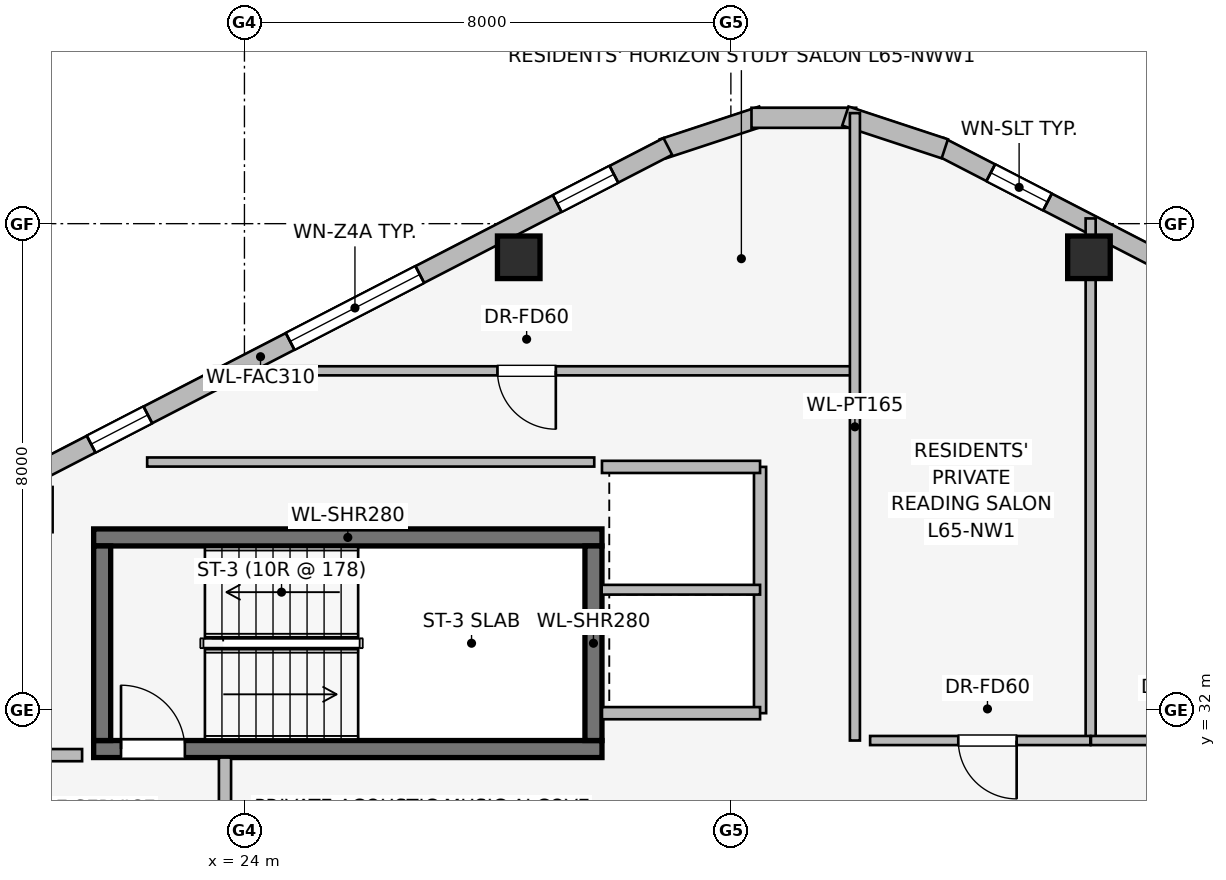
"""IFC4 building model, lengths in metres.
Left out: names, types, materials, properties, quantities, classifications, styles, units other than length and angle.
Written with IfcOpenShell. Run it as: python <this file> out.ifc"""

import sys

from ifc_helpers import new_model, si_unit, direction, frame, frame_2d, origin, origin_2d, place, context, subcontext, project, spatial, rectangle, extrude, element, fill, save


model = new_model("IFC4")
c1 = context("Model", 3, precision=1e-05, world=origin(), true_north=direction((0.0, 1.0)))
c2 = subcontext(c1, "Body", "Model", "MODEL_VIEW")
j1 = project(units=[si_unit("LENGTHUNIT", "METRE"), si_unit("PLANEANGLEUNIT", "RADIAN")], contexts=[c1])
p1 = place(None, origin())
s1 = spatial("IfcSite", under=j1, at=p1, CompositionType="ELEMENT")
p2 = place(p1, origin())
s2 = spatial("IfcBuilding", under=s1, at=p2, CompositionType="ELEMENT")
p3 = place(p2, frame((0.0, 0.0, 238.35)))
s3 = spatial("IfcBuildingStorey", under=s2, at=p3, CompositionType="ELEMENT", Elevation=238.35)
p4 = place(p3, frame((21.52, 31.36, 0.0), z_axis=(0.0, 0.0, 1.0), x_axis=(1.0, 0.0, 0.0)))
e1 = element("IfcWall", 1, at=p4, inside=s3, PredefinedType="SHEAR", context=c2, shape_type="SweptSolid", body=[
    extrude(rectangle(XDim=8.36, YDim=0.28, at=frame_2d((4.18, 0.0))), origin(), (0.0, 0.0, 1.0), 3.55),
])
p5 = place(p4, frame((0.45, 0.0, 0.0)))
e2 = element("IfcOpeningElement", 2, at=p5, cuts=e1, PredefinedType="OPENING", context=c2, shape_type="SweptSolid", body=[
    extrude(rectangle(XDim=1.05, YDim=2.0, at=frame_2d((0.525, 1.0))), frame((0.0, 0.15, 0.0), z_axis=(0.0, -1.0, 0.0), x_axis=(1.0, 0.0, 0.0)), (0.0, 0.0, 1.0), 0.3),
])
p6 = place(p3, frame((29.88, 34.84, 0.0), z_axis=(0.0, 0.0, 1.0), x_axis=(-1.0, 0.0, 0.0)))
e3 = element("IfcWall", 3, at=p6, inside=s3, PredefinedType="SHEAR", context=c2, shape_type="SweptSolid", body=[
    extrude(rectangle(XDim=8.36, YDim=0.28, at=frame_2d((4.18, 0.0))), origin(), (0.0, 0.0, 1.0), 3.55),
])
for number, where, z_axis, x_axis in (
    (4, (21.66, 34.7, 0.0), (0.0, 0.0, 1.0), (0.0, -1.0, 0.0)),
    (5, (29.74, 31.5, 0.0), (0.0, 0.0, 1.0), (0.0, 1.0, 0.0)),
):
    element("IfcWall", number, at=place(p3, frame(where, z_axis=z_axis, x_axis=x_axis)), inside=s3, PredefinedType="SHEAR", context=c2, shape_type="SweptSolid", body=[
        extrude(rectangle(XDim=3.2, YDim=0.28, at=frame_2d((1.6, 0.0))), origin(), (0.0, 0.0, 1.0), 3.55),
    ])
for number, where, z_axis, x_axis in (
    (6, (37.889, 39.447, 0.0), (0.0, 0.0, 1.0), (1.0, 0.0, 0.0)),
    (7, (28.511, 39.447, 0.0), (0.0, 0.0, 1.0), (1.0, 0.0, 0.0)),
):
    element("IfcColumn", number, at=place(p3, frame(where, z_axis=z_axis, x_axis=x_axis)), inside=s3, PredefinedType="COLUMN", context=c2, shape_type="SweptSolid", body=[
        extrude(rectangle(XDim=0.7, YDim=0.7, at=origin_2d()), origin(), (0.0, 0.0, 1.0), 3.55),
    ])
p7 = place(p3, frame((35.437, 41.27, 0.0), z_axis=(0.0, 0.0, 1.0), x_axis=(0.888581481622, -0.458718814218, 0.0)))
e8 = element("IfcWall", 8, at=p7, inside=s3, PredefinedType="STANDARD", context=c2, shape_type="SweptSolid", body=[
    extrude(rectangle(XDim=15.077, YDim=0.31, at=frame_2d((7.539, 0.0))), origin(), (0.0, 0.0, 1.0), 3.26),
])
p8 = place(p7, frame((0.942, 0.0, 0.75)))
e9 = element("IfcOpeningElement", 9, at=p8, cuts=e8, PredefinedType="OPENING", context=c2, shape_type="SweptSolid", body=[
    extrude(rectangle(XDim=1.05, YDim=1.4, at=frame_2d((0.525, 0.7))), frame((0.0, 0.165, 0.0), z_axis=(0.0, -1.0, 0.0), x_axis=(1.0, 0.0, 0.0)), (0.0, 0.0, 1.0), 0.33),
])
p9 = place(p7, frame((4.344, 0.0, 0.75)))
e10 = element("IfcOpeningElement", 10, at=p9, cuts=e8, PredefinedType="OPENING", context=c2, shape_type="SweptSolid", body=[
    extrude(rectangle(XDim=1.05, YDim=1.4, at=frame_2d((0.525, 0.7))), frame((0.0, 0.165, 0.0), z_axis=(0.0, -1.0, 0.0), x_axis=(1.0, 0.0, 0.0)), (0.0, 0.0, 1.0), 0.33),
])
p10 = place(p7, frame((7.013, 0.0, 0.75)))
e11 = element("IfcOpeningElement", 11, at=p10, cuts=e8, PredefinedType="OPENING", context=c2, shape_type="SweptSolid", body=[
    extrude(rectangle(XDim=1.05, YDim=1.4, at=frame_2d((0.525, 0.7))), frame((0.0, 0.165, 0.0), z_axis=(0.0, -1.0, 0.0), x_axis=(1.0, 0.0, 0.0)), (0.0, 0.0, 1.0), 0.33),
])
p11 = place(p7, frame((9.681, 0.0, 0.75)))
e12 = element("IfcOpeningElement", 12, at=p11, cuts=e8, PredefinedType="OPENING", context=c2, shape_type="SweptSolid", body=[
    extrude(rectangle(XDim=1.05, YDim=1.4, at=frame_2d((0.525, 0.7))), frame((0.0, 0.165, 0.0), z_axis=(0.0, -1.0, 0.0), x_axis=(1.0, 0.0, 0.0)), (0.0, 0.0, 1.0), 0.33),
])
p12 = place(p7, frame((13.029, 0.0, 0.75)))
e13 = element("IfcOpeningElement", 13, at=p12, cuts=e8, PredefinedType="OPENING", context=c2, shape_type="SweptSolid", body=[
    extrude(rectangle(XDim=1.05, YDim=1.4, at=frame_2d((0.525, 0.7))), frame((0.0, 0.165, 0.0), z_axis=(0.0, -1.0, 0.0), x_axis=(1.0, 0.0, 0.0)), (0.0, 0.0, 1.0), 0.33),
])
p13 = place(p3, frame((30.882, 41.231, 0.0), z_axis=(0.0, 0.0, 1.0), x_axis=(0.949713440491, 0.313120393699, 0.0)))
e14 = element("IfcWall", 14, at=p13, inside=s3, PredefinedType="STANDARD", context=c2, shape_type="SweptSolid", body=[
    extrude(rectangle(XDim=1.722, YDim=0.33, at=frame_2d((0.861, 0.0))), origin(), (0.0, 0.0, 1.0), 3.26),
])
p14 = place(p3, frame((32.339, 41.741, 0.0), z_axis=(0.0, 0.0, 1.0), x_axis=(1.0, 0.0, 0.0)))
e15 = element("IfcWall", 15, at=p14, inside=s3, PredefinedType="STANDARD", context=c2, shape_type="SweptSolid", body=[
    extrude(rectangle(XDim=1.722, YDim=0.33, at=frame_2d((0.861, 0.0))), origin(), (0.0, 0.0, 1.0), 3.26),
])
p15 = place(p3, frame((33.883, 41.77, 0.0), z_axis=(0.0, 0.0, 1.0), x_axis=(0.949713440491, -0.313120393699, 0.0)))
e16 = element("IfcWall", 16, at=p15, inside=s3, PredefinedType="STANDARD", context=c2, shape_type="SweptSolid", body=[
    extrude(rectangle(XDim=1.722, YDim=0.33, at=frame_2d((0.861, 0.0))), origin(), (0.0, 0.0, 1.0), 3.26),
])
p16 = place(p3, frame((17.566, 34.354, 0.0), z_axis=(0.0, 0.0, 1.0), x_axis=(0.888581481622, 0.458718814218, 0.0)))
e17 = element("IfcWall", 17, at=p16, inside=s3, PredefinedType="STANDARD", context=c2, shape_type="SweptSolid", body=[
    extrude(rectangle(XDim=15.077, YDim=0.31, at=frame_2d((7.539, 0.0))), origin(), (0.0, 0.0, 1.0), 3.26),
])
p17 = place(p16, frame((0.998, 0.0, 0.75)))
e18 = element("IfcOpeningElement", 18, at=p17, cuts=e17, PredefinedType="OPENING", context=c2, shape_type="SweptSolid", body=[
    extrude(rectangle(XDim=1.05, YDim=1.4, at=frame_2d((0.525, 0.7))), frame((0.0, 0.165, 0.0), z_axis=(0.0, -1.0, 0.0), x_axis=(1.0, 0.0, 0.0)), (0.0, 0.0, 1.0), 0.33),
])
p18 = place(p16, frame((4.403, 0.0, 0.75)))
e19 = element("IfcOpeningElement", 19, at=p18, cuts=e17, PredefinedType="OPENING", context=c2, shape_type="SweptSolid", body=[
    extrude(rectangle(XDim=1.05, YDim=1.4, at=frame_2d((0.525, 0.7))), frame((0.0, 0.165, 0.0), z_axis=(0.0, -1.0, 0.0), x_axis=(1.0, 0.0, 0.0)), (0.0, 0.0, 1.0), 0.33),
])
p19 = place(p16, frame((8.086, 0.0, 0.75)))
e20 = element("IfcOpeningElement", 20, at=p19, cuts=e17, PredefinedType="OPENING", context=c2, shape_type="SweptSolid", body=[
    extrude(rectangle(XDim=2.4, YDim=1.6, at=frame_2d((1.2, 0.8))), frame((0.0, 0.165, 0.0), z_axis=(0.0, -1.0, 0.0), x_axis=(1.0, 0.0, 0.0)), (0.0, 0.0, 1.0), 0.33),
])
p20 = place(p16, frame((13.029, 0.0, 0.75)))
e21 = element("IfcOpeningElement", 21, at=p20, cuts=e17, PredefinedType="OPENING", context=c2, shape_type="SweptSolid", body=[
    extrude(rectangle(XDim=1.05, YDim=1.4, at=frame_2d((0.525, 0.7))), frame((0.0, 0.165, 0.0), z_axis=(0.0, -1.0, 0.0), x_axis=(1.0, 0.0, 0.0)), (0.0, 0.0, 1.0), 0.33),
])
p21 = place(p3, frame((23.68, 25.68, 0.0), z_axis=(0.0, 0.0, 1.0), x_axis=(0.0, 1.0, 0.0)))
e22 = element("IfcWall", 22, at=p21, inside=s3, PredefinedType="PARTITIONING", context=c2, shape_type="SweptSolid", body=[
    extrude(rectangle(XDim=5.54, YDim=0.2, at=frame_2d((2.77, 0.0))), origin(), (0.0, 0.0, 1.0), 3.26),
])
p22 = place(p21, frame((1.8, 0.0, 0.0)))
e23 = element("IfcOpeningElement", 23, at=p22, cuts=e22, PredefinedType="OPENING", context=c2, shape_type="SweptSolid", body=[
    extrude(rectangle(XDim=1.05, YDim=2.0, at=frame_2d((0.525, 1.0))), frame((0.0, 0.11, 0.0), z_axis=(0.0, -1.0, 0.0), x_axis=(1.0, 0.0, 0.0)), (0.0, 0.0, 1.0), 0.22),
])
p23 = place(p3, frame((21.33, 31.26, 0.0), z_axis=(0.0, 0.0, 1.0), x_axis=(-1.0, 0.0, 0.0)))
e24 = element("IfcWall", 24, at=p23, inside=s3, PredefinedType="PARTITIONING", context=c2, shape_type="SweptSolid", body=[
    extrude(rectangle(XDim=1.68, YDim=0.2, at=frame_2d((0.84, 0.0))), origin(), (0.0, 0.0, 1.0), 3.26),
])
p24 = place(p3, frame((32.48, 31.95, 0.0), z_axis=(0.0, 0.0, 1.0), x_axis=(0.0, 1.0, 0.0)))
e25 = element("IfcWall", 25, at=p24, inside=s3, PredefinedType="PARTITIONING", context=c2, shape_type="SweptSolid", body=[
    extrude(rectangle(XDim=4.05, YDim=0.2, at=frame_2d((2.025, 0.0))), origin(), (0.0, 0.0, 1.0), 3.26),
])
p25 = place(p3, frame((29.88, 36.0, 0.0), z_axis=(0.0, 0.0, 1.0), x_axis=(1.0, 0.0, 0.0)))
e26 = element("IfcWall", 26, at=p25, inside=s3, PredefinedType="PARTITIONING", context=c2, shape_type="SweptSolid", body=[
    extrude(rectangle(XDim=2.6, YDim=0.2, at=frame_2d((1.3, 0.0))), origin(), (0.0, 0.0, 1.0), 3.26),
])
p26 = place(p3, frame((32.48, 31.95, 0.0), z_axis=(0.0, 0.0, 1.0), x_axis=(-1.0, 0.0, 0.0)))
e27 = element("IfcWall", 27, at=p26, inside=s3, PredefinedType="PARTITIONING", context=c2, shape_type="SweptSolid", body=[
    extrude(rectangle(XDim=2.6, YDim=0.2, at=frame_2d((1.3, 0.0))), origin(), (0.0, 0.0, 1.0), 2.652),
])
p27 = place(p3, frame((29.875, 33.98, 0.0), z_axis=(0.0, 0.0, 1.0), x_axis=(1.0, 0.0, 0.0)))
e28 = element("IfcWall", 28, at=p27, inside=s3, PredefinedType="PARTITIONING", context=c2, shape_type="SweptSolid", body=[
    extrude(rectangle(XDim=2.605, YDim=0.16, at=frame_2d((1.302, 0.0))), origin(), (0.0, 0.0, 1.0), 3.26),
])
p28 = place(p3, frame((34.0, 37.58, 0.0), z_axis=(0.0, 0.0, 1.0), x_axis=(-1.0, 0.0, 0.0)))
e29 = element("IfcWall", 29, at=p28, inside=s3, PredefinedType="PARTITIONING", context=c2, shape_type="SweptSolid", body=[
    extrude(rectangle(XDim=10.501, YDim=0.15, at=frame_2d((5.25, 0.0))), origin(), (0.0, 0.0, 1.0), 3.26),
])
p29 = place(p28, frame((4.879, 0.0, 0.0)))
e30 = element("IfcOpeningElement", 30, at=p29, cuts=e29, PredefinedType="OPENING", context=c2, shape_type="SweptSolid", body=[
    extrude(rectangle(XDim=0.96, YDim=2.0, at=frame_2d((0.48, 1.0))), frame((0.0, 0.085, 0.0), z_axis=(0.0, -1.0, 0.0), x_axis=(1.0, 0.0, 0.0)), (0.0, 0.0, 1.0), 0.17),
])
p30 = place(p3, frame((34.04, 31.5, 0.0), z_axis=(0.0, 0.0, 1.0), x_axis=(0.0, 1.0, 0.0)))
e31 = element("IfcWall", 31, at=p30, inside=s3, PredefinedType="PARTITIONING", context=c2, shape_type="SweptSolid", body=[
    extrude(rectangle(XDim=10.318, YDim=0.165, at=frame_2d((5.159, 0.0))), origin(), (0.0, 0.0, 1.0), 3.26),
])
p31 = place(p3, frame((37.917, 31.51, 0.0), z_axis=(0.0, 0.0, 1.0), x_axis=(0.0, 1.0, 0.0)))
e32 = element("IfcWall", 32, at=p31, inside=s3, PredefinedType="PARTITIONING", context=c2, shape_type="SweptSolid", body=[
    extrude(rectangle(XDim=8.576, YDim=0.165, at=frame_2d((4.288, 0.0))), origin(), (0.0, 0.0, 1.0), 2.649),
])
p32 = place(p3, frame((37.912, 31.5, 0.0), z_axis=(0.0, 0.0, 1.0), x_axis=(-1.0, 0.0, 0.0)))
e33 = element("IfcWall", 33, at=p32, inside=s3, PredefinedType="PARTITIONING", context=c2, shape_type="SweptSolid", body=[
    extrude(rectangle(XDim=3.622, YDim=0.15, at=frame_2d((1.811, 0.0))), origin(), (0.0, 0.0, 1.0), 3.26),
])
p33 = place(p32, frame((1.212, 0.0, 0.0)))
e34 = element("IfcOpeningElement", 34, at=p33, cuts=e33, PredefinedType="OPENING", context=c2, shape_type="SweptSolid", body=[
    extrude(rectangle(XDim=0.96, YDim=2.0, at=frame_2d((0.48, 1.0))), frame((0.0, 0.085, 0.0), z_axis=(0.0, -1.0, 0.0), x_axis=(1.0, 0.0, 0.0)), (0.0, 0.0, 1.0), 0.17),
])
p34 = place(p3, frame((41.45, 31.5, 0.0), z_axis=(0.0, 0.0, 1.0), x_axis=(-1.0, 0.0, 0.0)))
e35 = element("IfcWall", 35, at=p34, inside=s3, PredefinedType="PARTITIONING", context=c2, shape_type="SweptSolid", body=[
    extrude(rectangle(XDim=3.528, YDim=0.15, at=frame_2d((1.764, 0.0))), origin(), (0.0, 0.0, 1.0), 3.26),
])
p35 = place(p34, frame((1.524, 0.0, 0.0)))
e36 = element("IfcOpeningElement", 36, at=p35, cuts=e35, PredefinedType="OPENING", context=c2, shape_type="SweptSolid", body=[
    extrude(rectangle(XDim=0.96, YDim=2.0, at=frame_2d((0.48, 1.0))), frame((0.0, 0.085, 0.0), z_axis=(0.0, -1.0, 0.0), x_axis=(1.0, 0.0, 0.0)), (0.0, 0.0, 1.0), 0.17),
])
p36 = place(p3, frame((29.753, 36.08, 0.0), z_axis=(0.0, 0.0, 1.0), x_axis=(-1.0, 0.0, 0.0)))
e37 = element("IfcWall", 37, at=p36, inside=s3, PredefinedType="PARTITIONING", context=c2, shape_type="SweptSolid", body=[
    extrude(rectangle(XDim=7.353, YDim=0.15, at=frame_2d((3.677, 0.0))), origin(), (0.0, 0.0, 1.0), 3.26),
])
p37 = place(p8, origin())
e38 = element("IfcWindow", 38, at=p37, inside=s3, PartitioningType="SINGLE_PANEL", PredefinedType="WINDOW", context=c2, shape_type="SweptSolid", body=[
    extrude(rectangle(XDim=1.05, YDim=1.4, at=frame_2d((0.525, 0.7))), frame((0.0, 0.03, 0.0), z_axis=(0.0, -1.0, 0.0), x_axis=(1.0, 0.0, 0.0)), (0.0, 0.0, 1.0), 0.06),
])
fill(e9, e38)
p38 = place(p18, origin())
e39 = element("IfcWindow", 39, at=p38, inside=s3, PartitioningType="SINGLE_PANEL", PredefinedType="WINDOW", context=c2, shape_type="SweptSolid", body=[
    extrude(rectangle(XDim=1.05, YDim=1.4, at=frame_2d((0.525, 0.7))), frame((0.0, 0.03, 0.0), z_axis=(0.0, -1.0, 0.0), x_axis=(1.0, 0.0, 0.0)), (0.0, 0.0, 1.0), 0.06),
])
fill(e19, e39)
p39 = place(p19, origin())
e40 = element("IfcWindow", 40, at=p39, inside=s3, PartitioningType="SINGLE_PANEL", PredefinedType="WINDOW", context=c2, shape_type="SweptSolid", body=[
    extrude(rectangle(XDim=2.4, YDim=1.6, at=frame_2d((1.2, 0.8))), frame((0.0, 0.03, 0.0), z_axis=(0.0, -1.0, 0.0), x_axis=(1.0, 0.0, 0.0)), (0.0, 0.0, 1.0), 0.06),
])
fill(e20, e40)
p40 = place(p20, origin())
e41 = element("IfcWindow", 41, at=p40, inside=s3, PartitioningType="SINGLE_PANEL", PredefinedType="WINDOW", context=c2, shape_type="SweptSolid", body=[
    extrude(rectangle(XDim=1.05, YDim=1.4, at=frame_2d((0.525, 0.7))), frame((0.0, 0.03, 0.0), z_axis=(0.0, -1.0, 0.0), x_axis=(1.0, 0.0, 0.0)), (0.0, 0.0, 1.0), 0.06),
])
fill(e21, e41)
p41 = place(p5, origin())
e42 = element("IfcDoor", 42, at=p41, inside=s3, OperationType="SINGLE_SWING_LEFT", PredefinedType="DOOR", context=c2, shape_type="SweptSolid", body=[
    extrude(rectangle(XDim=1.05, YDim=2.0, at=frame_2d((0.525, 1.0))), frame((0.0, 0.025, 0.0), z_axis=(0.0, -1.0, 0.0), x_axis=(1.0, 0.0, 0.0)), (0.0, 0.0, 1.0), 0.05),
])
fill(e2, e42)
p42 = place(p29, origin())
e43 = element("IfcDoor", 43, at=p42, inside=s3, OperationType="SINGLE_SWING_LEFT", PredefinedType="DOOR", context=c2, shape_type="SweptSolid", body=[
    extrude(rectangle(XDim=0.96, YDim=2.0, at=frame_2d((0.48, 1.0))), frame((0.0, 0.025, 0.0), z_axis=(0.0, -1.0, 0.0), x_axis=(1.0, 0.0, 0.0)), (0.0, 0.0, 1.0), 0.05),
])
fill(e30, e43)
p43 = place(p33, origin())
e44 = element("IfcDoor", 44, at=p43, inside=s3, OperationType="SINGLE_SWING_LEFT", PredefinedType="DOOR", context=c2, shape_type="SweptSolid", body=[
    extrude(rectangle(XDim=0.96, YDim=2.0, at=frame_2d((0.48, 1.0))), frame((0.0, 0.025, 0.0), z_axis=(0.0, -1.0, 0.0), x_axis=(1.0, 0.0, 0.0)), (0.0, 0.0, 1.0), 0.05),
])
fill(e34, e44)
save(model, sys.argv[1])
